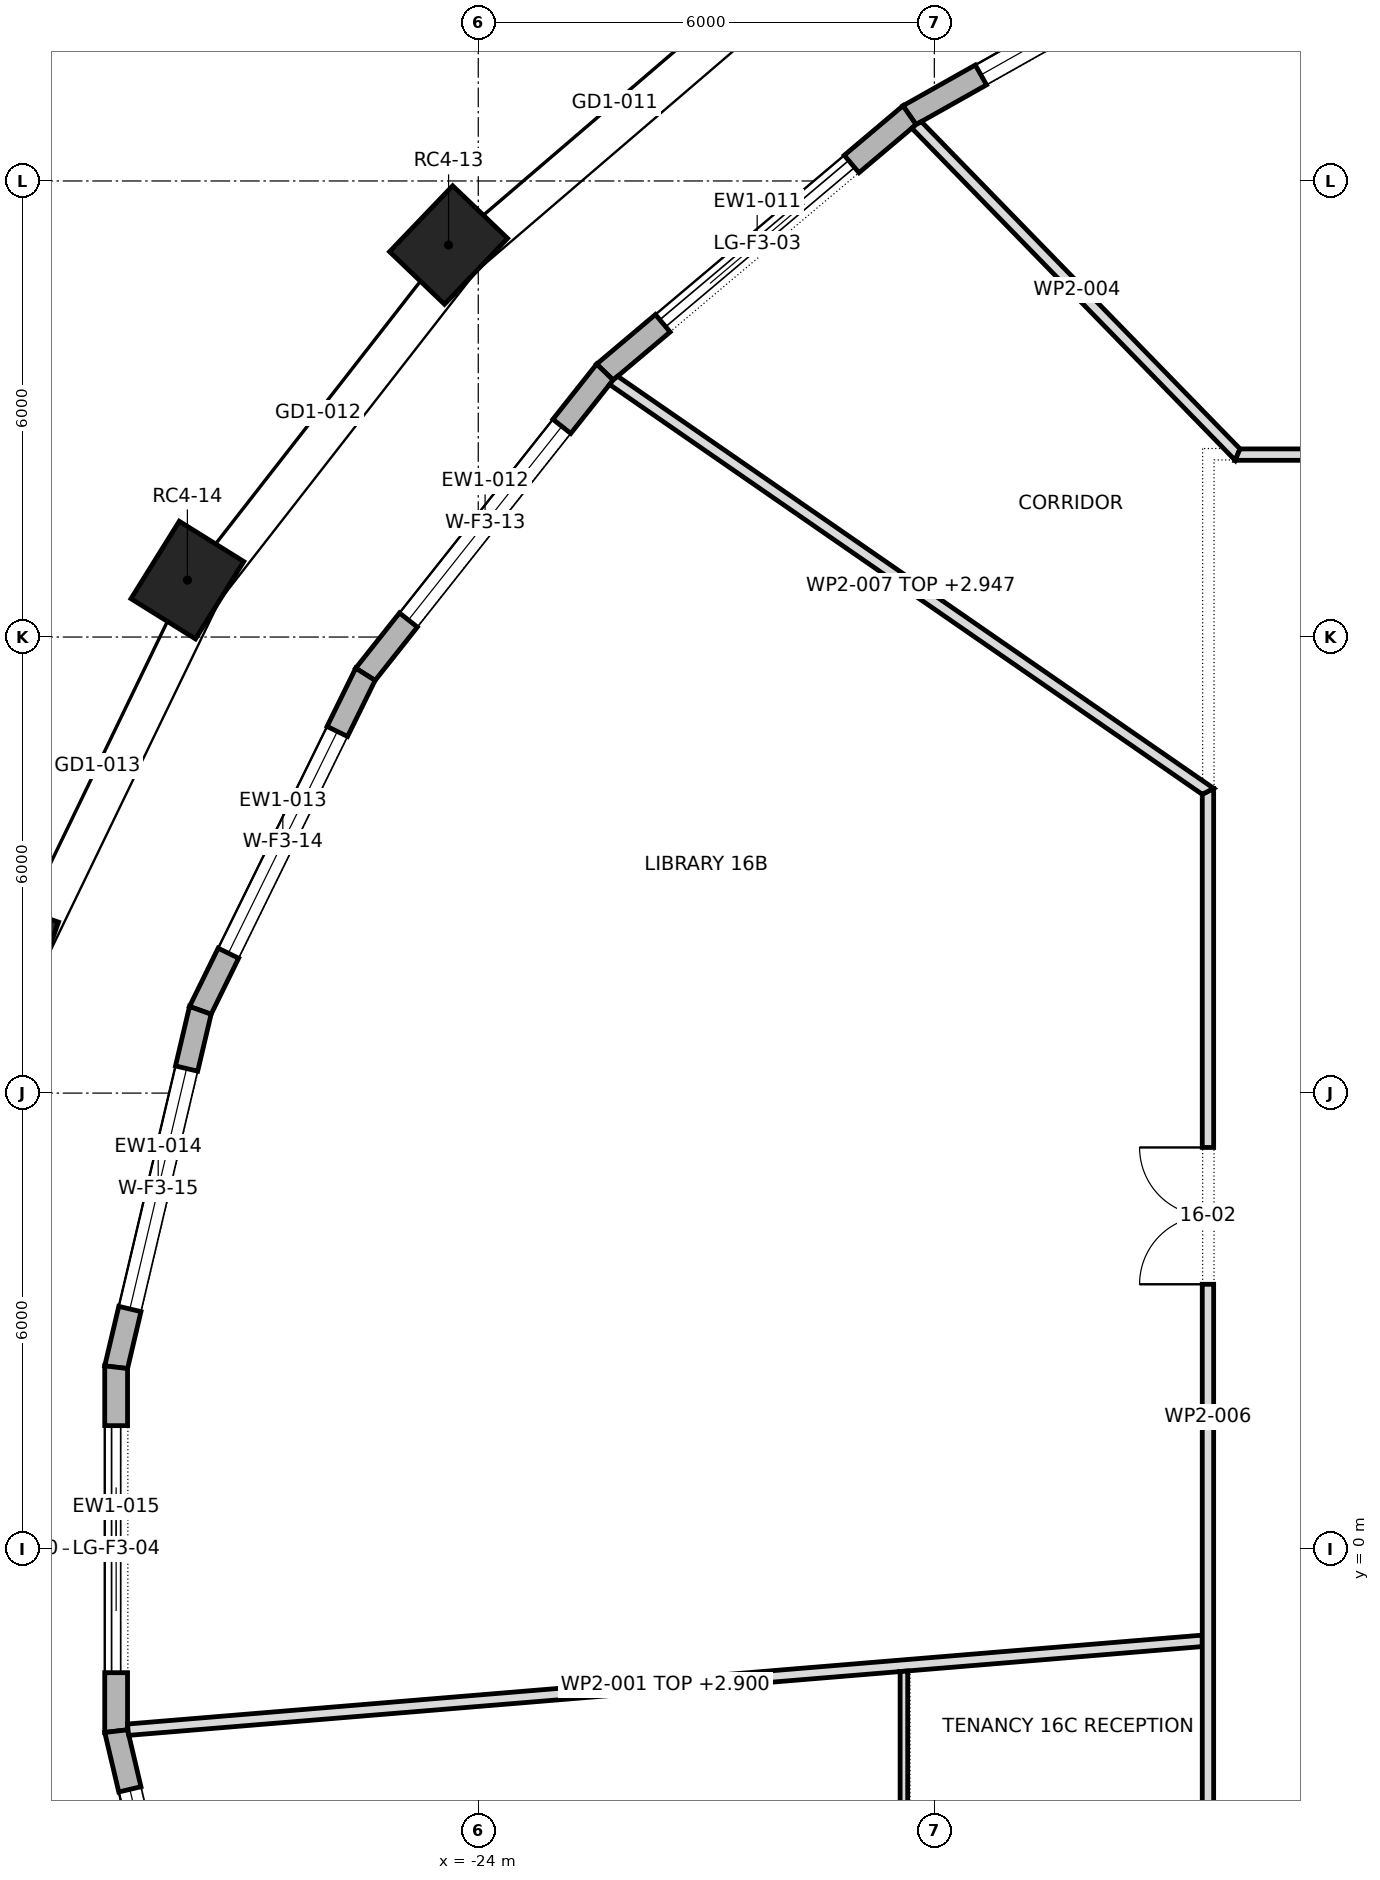
"""IFC4 building model, lengths in metres.
Left out: names, types, materials, properties, quantities, classifications, styles, units other than length and angle.
Written with IfcOpenShell. Run it as: python <this file> out.ifc"""

import sys

from ifc_helpers import new_model, si_unit, direction, frame, frame_2d, origin, origin_2d, place, context, subcontext, project, spatial, polyline, rectangle, outline, extrude, element, fill, save


model = new_model("IFC4")
c1 = context("Model", 3, precision=1e-05, world=origin(), true_north=direction((0.0, 1.0)))
c2 = subcontext(c1, "Body", "Model", "MODEL_VIEW")
j1 = project(units=[si_unit("LENGTHUNIT", "METRE"), si_unit("PLANEANGLEUNIT", "RADIAN")], contexts=[c1])
p1 = place(None, origin())
s1 = spatial("IfcSite", under=j1, at=p1, CompositionType="ELEMENT")
p2 = place(p1, origin())
s2 = spatial("IfcBuilding", under=s1, at=p2, CompositionType="ELEMENT")
p3 = place(p2, frame((0.0, 0.0, 226.9)))
s3 = spatial("IfcBuildingStorey", under=s2, at=p3, CompositionType="ELEMENT", Elevation=226.9)
for number, where, z_axis, x_axis in (
    (1, (-24.39, 17.157, 0.0), (0.0, 0.0, 1.0), (-0.692, -0.722, 0.0)),
    (2, (-27.827, 12.749, 0.0), (0.0, 0.0, 1.0), (-0.529, -0.849, 0.0)),
    (3, (-30.194, 7.851, 0.0), (0.0, 0.0, 1.0), (-0.334, -0.943, 0.0)),
):
    element("IfcColumn", number, at=place(p3, frame(where, z_axis=z_axis, x_axis=x_axis)), inside=s3, PredefinedType="COLUMN", context=c2, shape_type="SweptSolid", body=[
        extrude(rectangle(XDim=1.2, YDim=1.0, at=origin_2d()), origin(), (0.0, 0.0, 1.0), 4.0),
    ])
p4 = place(p3, frame((-13.616, 21.52, 0.0), z_axis=(0.0, 0.0, 1.0), x_axis=(-0.871225596594, -0.490882837181, 0.0)))
e4 = element("IfcWall", 4, at=p4, inside=s3, PredefinedType="STANDARD", context=c2, shape_type="SweptSolid", body=[
    extrude(outline(polyline([(-0.013, -0.15), (5.421, -0.15), (5.393, 0.15), (0.013, 0.15), (-0.013, -0.15)])), origin(), (0.0, 0.0, 1.0), 3.7),
])
p5 = place(p4, frame((1.078, 0.0, 0.6)))
e5 = element("IfcOpeningElement", 5, at=p5, cuts=e4, PredefinedType="OPENING", context=c2, shape_type="SweptSolid", body=[
    extrude(rectangle(XDim=3.25, YDim=2.65, at=frame_2d((1.625, 1.325))), frame((0.0, 0.162, 0.0), z_axis=(0.0, -1.0, 0.0), x_axis=(1.0, 0.0, 0.0)), (0.0, 0.0, 1.0), 0.324),
])
p6 = place(p3, frame((-18.326, 18.865, 0.0), z_axis=(0.0, 0.0, 1.0), x_axis=(-0.764475071601, -0.644653290459, 0.0)))
e6 = element("IfcWall", 6, at=p6, inside=s3, PredefinedType="STANDARD", context=c2, shape_type="SweptSolid", body=[
    extrude(outline(polyline([(-0.014, -0.15), (5.258, -0.15), (5.228, 0.15), (0.014, 0.15), (-0.014, -0.15)])), origin(), (0.0, 0.0, 1.0), 3.7),
])
p7 = place(p6, frame((0.996, 0.0, 0.0)))
e7 = element("IfcOpeningElement", 7, at=p7, cuts=e6, PredefinedType="OPENING", context=c2, shape_type="SweptSolid", body=[
    extrude(rectangle(XDim=3.25, YDim=3.25, at=frame_2d((1.625, 1.625))), frame((0.0, 0.162, 0.0), z_axis=(0.0, -1.0, 0.0), x_axis=(1.0, 0.0, 0.0)), (0.0, 0.0, 1.0), 0.324),
])
p8 = place(p3, frame((-22.334, 15.486, 0.0), z_axis=(0.0, 0.0, 1.0), x_axis=(-0.621084984443, -0.783743224596, 0.0)))
e8 = element("IfcWall", 8, at=p8, inside=s3, PredefinedType="STANDARD", context=c2, shape_type="SweptSolid", body=[
    extrude(outline(polyline([(-0.015, -0.15), (5.089, -0.15), (5.057, 0.15), (0.015, 0.15), (-0.015, -0.15)])), origin(), (0.0, 0.0, 1.0), 3.7),
])
p9 = place(p8, frame((0.912, 0.0, 0.6)))
e9 = element("IfcOpeningElement", 9, at=p9, cuts=e8, PredefinedType="OPENING", context=c2, shape_type="SweptSolid", body=[
    extrude(rectangle(XDim=3.25, YDim=2.65, at=frame_2d((1.625, 1.325))), frame((0.0, 0.162, 0.0), z_axis=(0.0, -1.0, 0.0), x_axis=(1.0, 0.0, 0.0)), (0.0, 0.0, 1.0), 0.324),
])
p10 = place(p3, frame((-25.485, 11.51, 0.0), z_axis=(0.0, 0.0, 1.0), x_axis=(-0.440857641837, -0.897577038272, 0.0)))
e10 = element("IfcWall", 10, at=p10, inside=s3, PredefinedType="STANDARD", context=c2, shape_type="SweptSolid", body=[
    extrude(outline(polyline([(-0.016, -0.15), (4.942, -0.15), (4.908, 0.15), (0.016, 0.15), (-0.016, -0.15)])), origin(), (0.0, 0.0, 1.0), 3.7),
])
p11 = place(p10, frame((0.838, 0.0, 0.6)))
e11 = element("IfcOpeningElement", 11, at=p11, cuts=e10, PredefinedType="OPENING", context=c2, shape_type="SweptSolid", body=[
    extrude(rectangle(XDim=3.25, YDim=2.65, at=frame_2d((1.625, 1.325))), frame((0.0, 0.162, 0.0), z_axis=(0.0, -1.0, 0.0), x_axis=(1.0, 0.0, 0.0)), (0.0, 0.0, 1.0), 0.324),
])
p12 = place(p3, frame((-27.656, 7.089, 0.0), z_axis=(0.0, 0.0, 1.0), x_axis=(-0.229617574796, -0.97328093033, 0.0)))
e12 = element("IfcWall", 12, at=p12, inside=s3, PredefinedType="STANDARD", context=c2, shape_type="SweptSolid", body=[
    extrude(outline(polyline([(-0.017, -0.15), (4.841, -0.15), (4.807, 0.15), (0.017, 0.15), (-0.017, -0.15)])), origin(), (0.0, 0.0, 1.0), 3.7),
])
p13 = place(p12, frame((0.787, 0.0, 0.6)))
e13 = element("IfcOpeningElement", 13, at=p13, cuts=e12, PredefinedType="OPENING", context=c2, shape_type="SweptSolid", body=[
    extrude(rectangle(XDim=3.25, YDim=2.65, at=frame_2d((1.625, 1.325))), frame((0.0, 0.162, 0.0), z_axis=(0.0, -1.0, 0.0), x_axis=(1.0, 0.0, 0.0)), (0.0, 0.0, 1.0), 0.324),
])
p14 = place(p3, frame((-28.764, 2.394, 0.0), z_axis=(0.0, 0.0, 1.0), x_axis=(0.0, -1.0, 0.0)))
e14 = element("IfcWall", 14, at=p14, inside=s3, PredefinedType="STANDARD", context=c2, shape_type="SweptSolid", body=[
    extrude(outline(polyline([(-0.017, -0.15), (4.805, -0.15), (4.77, 0.15), (0.017, 0.15), (-0.017, -0.15)])), origin(), (0.0, 0.0, 1.0), 3.7),
])
p15 = place(p14, frame((0.769, 0.0, 0.0)))
e15 = element("IfcOpeningElement", 15, at=p15, cuts=e14, PredefinedType="OPENING", context=c2, shape_type="SweptSolid", body=[
    extrude(rectangle(XDim=3.25, YDim=3.25, at=frame_2d((1.625, 1.625))), frame((0.0, 0.162, 0.0), z_axis=(0.0, -1.0, 0.0), x_axis=(1.0, 0.0, 0.0)), (0.0, 0.0, 1.0), 0.324),
])
p16 = place(p3, frame((-28.764, -2.394, 0.0), z_axis=(0.0, 0.0, 1.0), x_axis=(0.229617574796, -0.97328093033, 0.0)))
e16 = element("IfcWall", 16, at=p16, inside=s3, PredefinedType="STANDARD", context=c2, shape_type="SweptSolid", body=[
    extrude(outline(polyline([(-0.017, -0.15), (4.841, -0.15), (4.807, 0.15), (0.017, 0.15), (-0.017, -0.15)])), origin(), (0.0, 0.0, 1.0), 3.7),
])
p17 = place(p16, frame((0.787, 0.0, 0.6)))
e17 = element("IfcOpeningElement", 17, at=p17, cuts=e16, PredefinedType="OPENING", context=c2, shape_type="SweptSolid", body=[
    extrude(rectangle(XDim=3.25, YDim=2.65, at=frame_2d((1.625, 1.325))), frame((0.0, 0.162, 0.0), z_axis=(0.0, -1.0, 0.0), x_axis=(1.0, 0.0, 0.0)), (0.0, 0.0, 1.0), 0.324),
])
p18 = place(p3, frame((-28.608, -2.375, 0.0), z_axis=(0.0, 0.0, 1.0), x_axis=(0.996598135394, 0.082414540768, 0.0)))
e18 = element("IfcWall", 18, at=p18, inside=s3, PredefinedType="PARTITIONING", context=c2, shape_type="SweptSolid", body=[
    extrude(outline(polyline([(0.005, -0.075), (1.701, -0.075), (3.398, -0.075), (5.095, -0.075), (6.792, -0.075), (8.489, -0.075), (10.186, -0.075), (10.186, -0.075), (10.189, -0.075), (12.182, -0.075), (14.175, -0.075), (14.187, 0.071), (14.187, 0.075), (12.413, 0.075), (10.64, 0.075), (8.867, 0.075), (7.093, 0.075), (5.32, 0.075), (3.547, 0.075), (1.773, 0.075), (0.0, 0.075), (0.0, -0.044), (0.005, -0.075)])), origin(), (0.0, 0.0, 1.0), 2.9),
])
p19 = place(p3, frame((-18.4, -8.232, 0.0), z_axis=(0.0, 0.0, 1.0), x_axis=(0.0, 1.0, 0.0)))
e19 = element("IfcWall", 19, at=p19, inside=s3, PredefinedType="PARTITIONING", context=c2, shape_type="SweptSolid", body=[
    extrude(outline(polyline([(6.63, -0.05), (6.63, -0.048), (6.622, 0.05), (4.967, 0.05), (3.311, 0.05), (1.656, 0.05), (0.0, 0.05), (0.0, 0.05), (0.045, -0.05), (1.691, -0.05), (3.338, -0.05), (4.984, -0.05), (6.63, -0.05)])), origin(), (0.0, 0.0, 1.0), 3.7),
])
p20 = place(p19, frame((2.873, 0.0, 0.0)))
e20 = element("IfcOpeningElement", 20, at=p20, cuts=e19, PredefinedType="OPENING", context=c2, shape_type="SweptSolid", body=[
    extrude(rectangle(XDim=0.9, YDim=2.1, at=frame_2d((0.45, 1.05))), frame((0.0, 0.062, 0.0), z_axis=(0.0, -1.0, 0.0), x_axis=(1.0, 0.0, 0.0)), (0.0, 0.0, 1.0), 0.124),
])
p21 = place(p3, frame((-18.242, 18.747, 0.0), z_axis=(0.0, 0.0, 1.0), x_axis=(0.697616683155, -0.716471188105, 0.0)))
e21 = element("IfcWall", 21, at=p21, inside=s3, PredefinedType="PARTITIONING", context=c2, shape_type="SweptSolid", body=[
    extrude(outline(polyline([(0.0, -0.075), (1.525, -0.075), (3.049, -0.075), (4.574, -0.075), (6.099, -0.075), (6.067, 0.0), (6.035, 0.075), (4.533, 0.075), (3.031, 0.075), (1.528, 0.075), (0.025, 0.075), (0.005, -0.002), (0.0, -0.072), (0.0, -0.075)])), origin(), (0.0, 0.0, 1.0), 3.7),
])
p22 = place(p3, frame((-14.4, -6.49, 0.0), z_axis=(0.0, 0.0, 1.0), x_axis=(0.0, 1.0, 0.0)))
e22 = element("IfcWall", 22, at=p22, inside=s3, PredefinedType="PARTITIONING", context=c2, shape_type="SweptSolid", body=[
    extrude(outline(polyline([(16.499, -0.075), (16.499, -0.075), (16.421, 0.075), (14.596, 0.075), (12.772, 0.075), (10.947, 0.075), (9.123, 0.075), (7.298, 0.075), (5.474, 0.075), (3.649, 0.075), (1.824, 0.075), (0.0, 0.075), (0.0, -0.075), (1.833, -0.075), (3.667, -0.075), (5.5, -0.075), (7.333, -0.075), (9.166, -0.075), (11.0, -0.075), (12.833, -0.075), (14.666, -0.075), (16.499, -0.075)])), origin(), (0.0, 0.0, 1.0), 3.7),
])
p23 = place(p22, frame((9.975, 0.0, 0.0)))
e23 = element("IfcOpeningElement", 23, at=p23, cuts=e22, PredefinedType="OPENING", context=c2, shape_type="SweptSolid", body=[
    extrude(rectangle(XDim=1.8, YDim=2.1, at=frame_2d((0.9, 1.05))), frame((0.0, 0.087, 0.0), z_axis=(0.0, -1.0, 0.0), x_axis=(1.0, 0.0, 0.0)), (0.0, 0.0, 1.0), 0.174),
])
p24 = place(p22, frame((2.145, 0.0, 0.0)))
e24 = element("IfcOpeningElement", 24, at=p24, cuts=e22, PredefinedType="OPENING", context=c2, shape_type="SweptSolid", body=[
    extrude(rectangle(XDim=1.0, YDim=2.1, at=frame_2d((0.5, 1.05))), frame((0.0, 0.087, 0.0), z_axis=(0.0, -1.0, 0.0), x_axis=(1.0, 0.0, 0.0)), (0.0, 0.0, 1.0), 0.174),
])
p25 = place(p3, frame((-14.368, 9.948, 0.0), z_axis=(0.0, 0.0, 1.0), x_axis=(-0.822511136101, 0.568749005265, 0.0)))
e25 = element("IfcWall", 25, at=p25, inside=s3, PredefinedType="PARTITIONING", context=c2, shape_type="SweptSolid", body=[
    extrude(outline(polyline([(0.0, -0.075), (1.907, -0.075), (3.813, -0.075), (5.72, -0.075), (7.627, -0.075), (9.533, -0.075), (9.554, 0.0), (9.558, 0.069), (9.558, 0.075), (7.662, 0.075), (5.767, 0.075), (3.871, 0.075), (1.975, 0.075), (0.079, 0.075), (0.079, 0.075), (0.079, 0.075), (0.039, 0.0), (0.0, -0.075)])), origin(), (0.0, 0.0, 1.0), 2.947),
])
p26 = place(p3, frame((-14.042, 14.4, 0.0), z_axis=(0.0, 0.0, 1.0), x_axis=(1.0, 0.0, 0.0)))
e26 = element("IfcWall", 26, at=p26, inside=s3, PredefinedType="PARTITIONING", context=c2, shape_type="SweptSolid", body=[
    extrude(outline(polyline([(0.0, -0.075), (1.872, -0.075), (3.745, -0.075), (5.617, -0.075), (7.489, -0.075), (9.361, -0.075), (11.233, -0.075), (13.106, -0.075), (14.978, -0.075), (16.85, -0.075), (18.722, -0.075), (20.594, -0.075), (22.467, -0.075), (24.339, -0.075), (26.211, -0.075), (28.083, -0.075), (28.02, 0.075), (26.023, 0.075), (24.026, 0.075), (22.029, 0.075), (20.032, 0.075), (18.036, 0.075), (16.039, 0.075), (14.042, 0.075), (12.045, 0.075), (10.048, 0.075), (8.051, 0.075), (6.054, 0.075), (4.057, 0.075), (2.06, 0.075), (0.063, 0.075), (0.0, -0.075)])), origin(), (0.0, 0.0, 1.0), 3.7),
])
p27 = place(p26, frame((13.142, 0.0, 0.0)))
e27 = element("IfcOpeningElement", 27, at=p27, cuts=e26, PredefinedType="OPENING", context=c2, shape_type="SweptSolid", body=[
    extrude(rectangle(XDim=1.8, YDim=2.1, at=frame_2d((0.9, 1.05))), frame((0.0, 0.087, 0.0), z_axis=(0.0, -1.0, 0.0), x_axis=(1.0, 0.0, 0.0)), (0.0, 0.0, 1.0), 0.174),
])
p28 = place(p5, origin())
e28 = element("IfcWindow", 28, at=p28, inside=s3, PartitioningType="TRIPLE_PANEL_VERTICAL", PredefinedType="WINDOW", context=c2, shape_type="SweptSolid", body=[
    extrude(rectangle(XDim=3.25, YDim=2.65, at=frame_2d((1.625, 1.325))), frame((0.0, 0.03, 0.0), z_axis=(0.0, -1.0, 0.0), x_axis=(1.0, 0.0, 0.0)), (0.0, 0.0, 1.0), 0.06),
])
fill(e5, e28)
p29 = place(p7, origin())
e29 = element("IfcDoor", 29, at=p29, inside=s3, OperationType="DOUBLE_DOOR_SLIDING", PredefinedType="DOOR", context=c2, shape_type="SweptSolid", body=[
    extrude(rectangle(XDim=3.25, YDim=3.25, at=frame_2d((1.625, 1.625))), frame((0.0, 0.025, 0.0), z_axis=(0.0, -1.0, 0.0), x_axis=(1.0, 0.0, 0.0)), (0.0, 0.0, 1.0), 0.05),
])
fill(e7, e29)
p30 = place(p9, origin())
e30 = element("IfcWindow", 30, at=p30, inside=s3, PartitioningType="TRIPLE_PANEL_VERTICAL", PredefinedType="WINDOW", context=c2, shape_type="SweptSolid", body=[
    extrude(rectangle(XDim=3.25, YDim=2.65, at=frame_2d((1.625, 1.325))), frame((0.0, 0.03, 0.0), z_axis=(0.0, -1.0, 0.0), x_axis=(1.0, 0.0, 0.0)), (0.0, 0.0, 1.0), 0.06),
])
fill(e9, e30)
p31 = place(p11, origin())
e31 = element("IfcWindow", 31, at=p31, inside=s3, PartitioningType="TRIPLE_PANEL_VERTICAL", PredefinedType="WINDOW", context=c2, shape_type="SweptSolid", body=[
    extrude(rectangle(XDim=3.25, YDim=2.65, at=frame_2d((1.625, 1.325))), frame((0.0, 0.03, 0.0), z_axis=(0.0, -1.0, 0.0), x_axis=(1.0, 0.0, 0.0)), (0.0, 0.0, 1.0), 0.06),
])
fill(e11, e31)
p32 = place(p13, origin())
e32 = element("IfcWindow", 32, at=p32, inside=s3, PartitioningType="TRIPLE_PANEL_VERTICAL", PredefinedType="WINDOW", context=c2, shape_type="SweptSolid", body=[
    extrude(rectangle(XDim=3.25, YDim=2.65, at=frame_2d((1.625, 1.325))), frame((0.0, 0.03, 0.0), z_axis=(0.0, -1.0, 0.0), x_axis=(1.0, 0.0, 0.0)), (0.0, 0.0, 1.0), 0.06),
])
fill(e13, e32)
p33 = place(p15, origin())
e33 = element("IfcDoor", 33, at=p33, inside=s3, OperationType="DOUBLE_DOOR_SLIDING", PredefinedType="DOOR", context=c2, shape_type="SweptSolid", body=[
    extrude(rectangle(XDim=3.25, YDim=3.25, at=frame_2d((1.625, 1.625))), frame((0.0, 0.025, 0.0), z_axis=(0.0, -1.0, 0.0), x_axis=(1.0, 0.0, 0.0)), (0.0, 0.0, 1.0), 0.05),
])
fill(e15, e33)
p34 = place(p17, origin())
e34 = element("IfcWindow", 34, at=p34, inside=s3, PartitioningType="TRIPLE_PANEL_VERTICAL", PredefinedType="WINDOW", context=c2, shape_type="SweptSolid", body=[
    extrude(rectangle(XDim=3.25, YDim=2.65, at=frame_2d((1.625, 1.325))), frame((0.0, 0.03, 0.0), z_axis=(0.0, -1.0, 0.0), x_axis=(1.0, 0.0, 0.0)), (0.0, 0.0, 1.0), 0.06),
])
fill(e17, e34)
p35 = place(p23, origin())
e35 = element("IfcDoor", 35, at=p35, inside=s3, OperationType="DOUBLE_DOOR_SINGLE_SWING", PredefinedType="DOOR", context=c2, shape_type="SweptSolid", body=[
    extrude(rectangle(XDim=1.8, YDim=2.1, at=frame_2d((0.9, 1.05))), frame((0.0, 0.025, 0.0), z_axis=(0.0, -1.0, 0.0), x_axis=(1.0, 0.0, 0.0)), (0.0, 0.0, 1.0), 0.05),
])
fill(e23, e35)
save(model, sys.argv[1])
